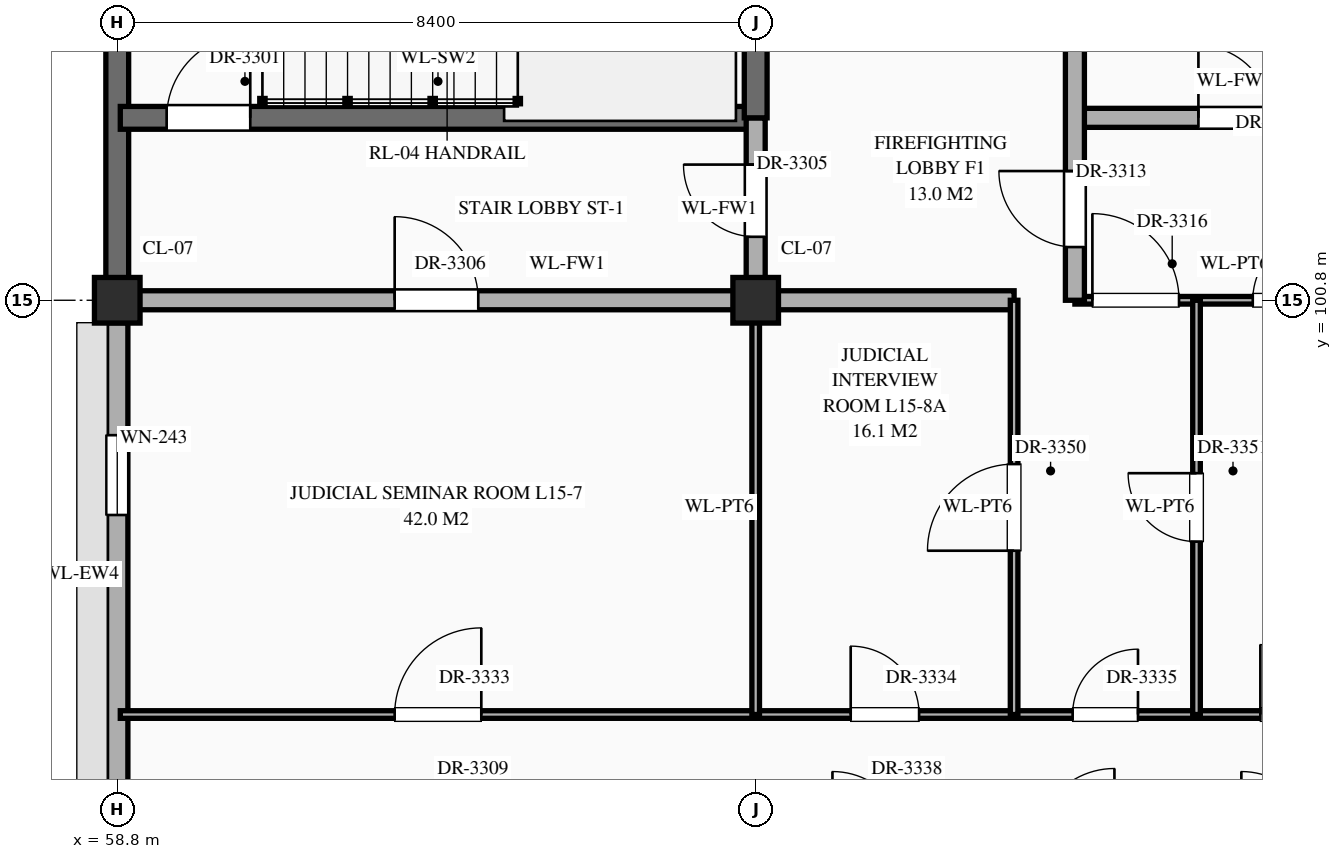
"""IFC4 building model, lengths in metres.
Left out: names, types, materials, properties, quantities, classifications, styles, units other than length and angle.
Written with IfcOpenShell. Run it as: python <this file> out.ifc"""

import sys

from ifc_helpers import new_model, si_unit, direction, frame, frame_2d, origin, origin_2d, place, context, subcontext, project, spatial, rectangle, extrude, element, fill, save


model = new_model("IFC4")
c1 = context("Model", 3, precision=1e-05, world=origin(), true_north=direction((0.0, 1.0)))
c2 = subcontext(c1, "Body", "Model", "MODEL_VIEW")
j1 = project(units=[si_unit("LENGTHUNIT", "METRE"), si_unit("PLANEANGLEUNIT", "RADIAN")], contexts=[c1])
p1 = place(None, origin())
s1 = spatial("IfcSite", under=j1, at=p1, CompositionType="ELEMENT")
p2 = place(p1, origin())
s2 = spatial("IfcBuilding", under=s1, at=p2, CompositionType="ELEMENT")
p3 = place(p2, frame((0.0, 0.0, 64.5)))
s3 = spatial("IfcBuildingStorey", under=s2, at=p3, CompositionType="ELEMENT", Elevation=64.5)
for number, where, z_axis, x_axis in (
    (1, (58.8, 100.8, 0.0), (0.0, 0.0, 1.0), (1.0, 0.0, 0.0)),
    (2, (67.2, 100.8, 0.0), (0.0, 0.0, 1.0), (1.0, 0.0, 0.0)),
):
    element("IfcColumn", number, at=place(p3, frame(where, z_axis=z_axis, x_axis=x_axis)), inside=s3, PredefinedType="COLUMN", context=c2, shape_type="SweptSolid", body=[
        extrude(rectangle(XDim=0.6, YDim=0.6, at=origin_2d()), origin(), (0.0, 0.0, 1.0), 4.2),
    ])
p4 = place(p3, frame((58.8, 93.895, 0.0), z_axis=(0.0, 0.0, 1.0), x_axis=(0.0, 1.0, 0.0)))
e3 = element("IfcWall", 3, at=p4, inside=s3, PredefinedType="STANDARD", context=c2, shape_type="SweptSolid", body=[
    extrude(rectangle(XDim=6.61, YDim=0.28, at=frame_2d((3.305, 0.0))), origin(), (0.0, 0.0, 1.0), 3.3),
])
p5 = place(p4, frame((4.08, 0.0, 0.85)))
e4 = element("IfcOpeningElement", 4, at=p5, cuts=e3, PredefinedType="OPENING", context=c2, shape_type="SweptSolid", body=[
    extrude(rectangle(XDim=1.05, YDim=1.74, at=frame_2d((0.525, 0.87))), frame((0.0, 0.152, 0.0), z_axis=(0.0, -1.0, 0.0), x_axis=(1.0, 0.0, 0.0)), (0.0, 0.0, 1.0), 0.304),
])
p6 = place(p3, frame((58.8, 101.095, 0.0), z_axis=(0.0, 0.0, 1.0), x_axis=(0.0, 1.0, 0.0)))
e5 = element("IfcWall", 5, at=p6, inside=s3, PredefinedType="SHEAR", context=c2, shape_type="SweptSolid", body=[
    extrude(rectangle(XDim=6.61, YDim=0.3, at=frame_2d((3.305, 0.0))), origin(), (0.0, 0.0, 1.0), 3.95),
])
p7 = place(p3, frame((58.84, 95.35, 0.0), z_axis=(0.0, 0.0, 1.0), x_axis=(1.0, 0.0, 0.0)))
e6 = element("IfcWall", 6, at=p7, inside=s3, PredefinedType="STANDARD", context=c2, shape_type="SweptSolid", body=[
    extrude(rectangle(XDim=50.32, YDim=0.1, at=frame_2d((25.16, 0.0))), origin(), (0.0, 0.0, 1.0), 3.95),
])
p8 = place(p7, frame((3.61, 0.0, 0.0)))
e7 = element("IfcOpeningElement", 7, at=p8, cuts=e6, PredefinedType="OPENING", context=c2, shape_type="SweptSolid", body=[
    extrude(rectangle(XDim=1.14, YDim=2.4, at=frame_2d((0.57, 1.2))), frame((0.0, 0.062, 0.0), z_axis=(0.0, -1.0, 0.0), x_axis=(1.0, 0.0, 0.0)), (0.0, 0.0, 1.0), 0.124),
])
p9 = place(p7, frame((9.61, 0.0, 0.0)))
e8 = element("IfcOpeningElement", 8, at=p9, cuts=e6, PredefinedType="OPENING", context=c2, shape_type="SweptSolid", body=[
    extrude(rectangle(XDim=0.9, YDim=2.15, at=frame_2d((0.45, 1.075))), frame((0.0, 0.062, 0.0), z_axis=(0.0, -1.0, 0.0), x_axis=(1.0, 0.0, 0.0)), (0.0, 0.0, 1.0), 0.124),
])
p10 = place(p7, frame((12.53, 0.0, 0.0)))
e9 = element("IfcOpeningElement", 9, at=p10, cuts=e6, PredefinedType="OPENING", context=c2, shape_type="SweptSolid", body=[
    extrude(rectangle(XDim=0.86, YDim=2.1, at=frame_2d((0.43, 1.05))), frame((0.0, 0.062, 0.0), z_axis=(0.0, -1.0, 0.0), x_axis=(1.0, 0.0, 0.0)), (0.0, 0.0, 1.0), 0.124),
])
p11 = place(p7, frame((15.0, 0.0, 0.0)))
e10 = element("IfcOpeningElement", 10, at=p11, cuts=e6, PredefinedType="OPENING", context=c2, shape_type="SweptSolid", body=[
    extrude(rectangle(XDim=0.92, YDim=2.15, at=frame_2d((0.46, 1.075))), frame((0.0, 0.062, 0.0), z_axis=(0.0, -1.0, 0.0), x_axis=(1.0, 0.0, 0.0)), (0.0, 0.0, 1.0), 0.124),
])
p12 = place(p7, frame((20.48, 0.0, 0.0)))
e11 = element("IfcOpeningElement", 11, at=p12, cuts=e6, PredefinedType="OPENING", context=c2, shape_type="SweptSolid", body=[
    extrude(rectangle(XDim=0.96, YDim=2.2, at=frame_2d((0.48, 1.1))), frame((0.0, 0.062, 0.0), z_axis=(0.0, -1.0, 0.0), x_axis=(1.0, 0.0, 0.0)), (0.0, 0.0, 1.0), 0.124),
])
p13 = place(p7, frame((28.8, 0.0, 0.0)))
e12 = element("IfcOpeningElement", 12, at=p13, cuts=e6, PredefinedType="OPENING", context=c2, shape_type="SweptSolid", body=[
    extrude(rectangle(XDim=1.12, YDim=2.25, at=frame_2d((0.56, 1.125))), frame((0.0, 0.062, 0.0), z_axis=(0.0, -1.0, 0.0), x_axis=(1.0, 0.0, 0.0)), (0.0, 0.0, 1.0), 0.124),
])
p14 = place(p7, frame((34.68, 0.0, 0.0)))
e13 = element("IfcOpeningElement", 13, at=p14, cuts=e6, PredefinedType="OPENING", context=c2, shape_type="SweptSolid", body=[
    extrude(rectangle(XDim=1.16, YDim=2.3, at=frame_2d((0.58, 1.15))), frame((0.0, 0.062, 0.0), z_axis=(0.0, -1.0, 0.0), x_axis=(1.0, 0.0, 0.0)), (0.0, 0.0, 1.0), 0.124),
])
p15 = place(p7, frame((37.56, 0.0, 0.0)))
e14 = element("IfcOpeningElement", 14, at=p15, cuts=e6, PredefinedType="OPENING", context=c2, shape_type="SweptSolid", body=[
    extrude(rectangle(XDim=1.2, YDim=2.35, at=frame_2d((0.6, 1.175))), frame((0.0, 0.062, 0.0), z_axis=(0.0, -1.0, 0.0), x_axis=(1.0, 0.0, 0.0)), (0.0, 0.0, 1.0), 0.124),
])
p16 = place(p7, frame((40.04, 0.0, 0.0)))
e15 = element("IfcOpeningElement", 15, at=p16, cuts=e6, PredefinedType="OPENING", context=c2, shape_type="SweptSolid", body=[
    extrude(rectangle(XDim=1.24, YDim=2.3, at=frame_2d((0.62, 1.15))), frame((0.0, 0.062, 0.0), z_axis=(0.0, -1.0, 0.0), x_axis=(1.0, 0.0, 0.0)), (0.0, 0.0, 1.0), 0.124),
])
p17 = place(p7, frame((45.5, 0.0, 0.0)))
e16 = element("IfcOpeningElement", 16, at=p17, cuts=e6, PredefinedType="OPENING", context=c2, shape_type="SweptSolid", body=[
    extrude(rectangle(XDim=1.28, YDim=2.35, at=frame_2d((0.64, 1.175))), frame((0.0, 0.062, 0.0), z_axis=(0.0, -1.0, 0.0), x_axis=(1.0, 0.0, 0.0)), (0.0, 0.0, 1.0), 0.124),
])
p18 = place(p3, frame((58.84, 100.8, 0.0), z_axis=(0.0, 0.0, 1.0), x_axis=(1.0, 0.0, 0.0)))
e17 = element("IfcWall", 17, at=p18, inside=s3, PredefinedType="STANDARD", context=c2, shape_type="SweptSolid", body=[
    extrude(rectangle(XDim=11.76, YDim=0.25, at=frame_2d((5.88, 0.0))), origin(), (0.0, 0.0, 1.0), 3.1),
])
p19 = place(p18, frame((3.61, 0.0, 0.0)))
e18 = element("IfcOpeningElement", 18, at=p19, cuts=e17, PredefinedType="OPENING", context=c2, shape_type="SweptSolid", body=[
    extrude(rectangle(XDim=1.1, YDim=2.2, at=frame_2d((0.55, 1.1))), frame((0.0, 0.137, 0.0), z_axis=(0.0, -1.0, 0.0), x_axis=(1.0, 0.0, 0.0)), (0.0, 0.0, 1.0), 0.274),
])
p20 = place(p3, frame((71.4, 100.8, 0.0), z_axis=(0.0, 0.0, 1.0), x_axis=(1.0, 0.0, 0.0)))
e19 = element("IfcWall", 19, at=p20, inside=s3, PredefinedType="STANDARD", context=c2, shape_type="SweptSolid", body=[
    extrude(rectangle(XDim=4.2, YDim=0.1, at=frame_2d((2.1, 0.0))), origin(), (0.0, 0.0, 1.0), 3.1),
])
p21 = place(p20, frame((0.23, 0.0, 0.0)))
e20 = element("IfcOpeningElement", 20, at=p21, cuts=e19, PredefinedType="OPENING", context=c2, shape_type="SweptSolid", body=[
    extrude(rectangle(XDim=1.14, YDim=2.4, at=frame_2d((0.57, 1.2))), frame((0.0, 0.062, 0.0), z_axis=(0.0, -1.0, 0.0), x_axis=(1.0, 0.0, 0.0)), (0.0, 0.0, 1.0), 0.124),
])
p22 = place(p20, frame((2.34, 0.0, 0.0)))
e21 = element("IfcOpeningElement", 21, at=p22, cuts=e19, PredefinedType="OPENING", context=c2, shape_type="SweptSolid", body=[
    extrude(rectangle(XDim=0.9, YDim=2.15, at=frame_2d((0.45, 1.075))), frame((0.0, 0.062, 0.0), z_axis=(0.0, -1.0, 0.0), x_axis=(1.0, 0.0, 0.0)), (0.0, 0.0, 1.0), 0.124),
])
p23 = place(p3, frame((58.84, 103.2, 0.0), z_axis=(0.0, 0.0, 1.0), x_axis=(1.0, 0.0, 0.0)))
e22 = element("IfcWall", 22, at=p23, inside=s3, PredefinedType="SHEAR", context=c2, shape_type="SweptSolid", body=[
    extrude(rectangle(XDim=8.36, YDim=0.3, at=frame_2d((4.18, 0.0))), origin(), (0.0, 0.0, 1.0), 3.95),
])
p24 = place(p23, frame((0.61, 0.0, 0.0)))
e23 = element("IfcOpeningElement", 23, at=p24, cuts=e22, PredefinedType="OPENING", context=c2, shape_type="SweptSolid", body=[
    extrude(rectangle(XDim=1.1, YDim=2.2, at=frame_2d((0.55, 1.1))), frame((0.0, 0.162, 0.0), z_axis=(0.0, -1.0, 0.0), x_axis=(1.0, 0.0, 0.0)), (0.0, 0.0, 1.0), 0.324),
])
p25 = place(p3, frame((71.4, 103.2, 0.0), z_axis=(0.0, 0.0, 1.0), x_axis=(1.0, 0.0, 0.0)))
e24 = element("IfcWall", 24, at=p25, inside=s3, PredefinedType="STANDARD", context=c2, shape_type="SweptSolid", body=[
    extrude(rectangle(XDim=4.2, YDim=0.25, at=frame_2d((2.1, 0.0))), origin(), (0.0, 0.0, 1.0), 3.95),
])
p26 = place(p25, frame((1.625, 0.0, 0.0)))
e25 = element("IfcOpeningElement", 25, at=p26, cuts=e24, PredefinedType="OPENING", context=c2, shape_type="SweptSolid", body=[
    extrude(rectangle(XDim=0.95, YDim=2.15, at=frame_2d((0.475, 1.075))), frame((0.0, 0.137, 0.0), z_axis=(0.0, -1.0, 0.0), x_axis=(1.0, 0.0, 0.0)), (0.0, 0.0, 1.0), 0.274),
])
p27 = place(p3, frame((67.2, 95.35, 0.0), z_axis=(0.0, 0.0, 1.0), x_axis=(0.0, 1.0, 0.0)))
e26 = element("IfcWall", 26, at=p27, inside=s3, PredefinedType="STANDARD", context=c2, shape_type="SweptSolid", body=[
    extrude(rectangle(XDim=5.45, YDim=0.1, at=frame_2d((2.725, 0.0))), origin(), (0.0, 0.0, 1.0), 3.2),
])
p28 = place(p3, frame((67.2, 100.8, 0.0), z_axis=(0.0, 0.0, 1.0), x_axis=(0.0, 1.0, 0.0)))
e27 = element("IfcWall", 27, at=p28, inside=s3, PredefinedType="STANDARD", context=c2, shape_type="SweptSolid", body=[
    extrude(rectangle(XDim=2.4, YDim=0.25, at=frame_2d((1.2, 0.0))), origin(), (0.0, 0.0, 1.0), 3.2),
])
p29 = place(p28, frame((0.835, 0.0, 0.0)))
e28 = element("IfcOpeningElement", 28, at=p29, cuts=e27, PredefinedType="OPENING", context=c2, shape_type="SweptSolid", body=[
    extrude(rectangle(XDim=0.95, YDim=2.15, at=frame_2d((0.475, 1.075))), frame((0.0, 0.137, 0.0), z_axis=(0.0, -1.0, 0.0), x_axis=(1.0, 0.0, 0.0)), (0.0, 0.0, 1.0), 0.274),
])
p30 = place(p3, frame((67.2, 103.2, 0.0), z_axis=(0.0, 0.0, 1.0), x_axis=(0.0, 1.0, 0.0)))
e29 = element("IfcWall", 29, at=p30, inside=s3, PredefinedType="SHEAR", context=c2, shape_type="SweptSolid", body=[
    extrude(rectangle(XDim=1.2, YDim=0.3, at=frame_2d((0.6, 0.0))), origin(), (0.0, 0.0, 1.0), 3.95),
])
p31 = place(p3, frame((70.6, 95.35, 0.0), z_axis=(0.0, 0.0, 1.0), x_axis=(0.0, 1.0, 0.0)))
e30 = element("IfcWall", 30, at=p31, inside=s3, PredefinedType="STANDARD", context=c2, shape_type="SweptSolid", body=[
    extrude(rectangle(XDim=5.45, YDim=0.1, at=frame_2d((2.725, 0.0))), origin(), (0.0, 0.0, 1.0), 3.95),
])
p32 = place(p31, frame((2.155, 0.0, 0.0)))
e31 = element("IfcOpeningElement", 31, at=p32, cuts=e30, PredefinedType="OPENING", context=c2, shape_type="SweptSolid", body=[
    extrude(rectangle(XDim=1.14, YDim=2.4, at=frame_2d((0.57, 1.2))), frame((0.0, 0.062, 0.0), z_axis=(0.0, -1.0, 0.0), x_axis=(1.0, 0.0, 0.0)), (0.0, 0.0, 1.0), 0.124),
])
p33 = place(p3, frame((71.4, 100.8, 0.0), z_axis=(0.0, 0.0, 1.0), x_axis=(0.0, 1.0, 0.0)))
e32 = element("IfcWall", 32, at=p33, inside=s3, PredefinedType="STANDARD", context=c2, shape_type="SweptSolid", body=[
    extrude(rectangle(XDim=3.6, YDim=0.25, at=frame_2d((1.8, 0.0))), origin(), (0.0, 0.0, 1.0), 3.6),
])
p34 = place(p33, frame((0.7, 0.0, 0.0)))
e33 = element("IfcOpeningElement", 33, at=p34, cuts=e32, PredefinedType="OPENING", context=c2, shape_type="SweptSolid", body=[
    extrude(rectangle(XDim=1.0, YDim=2.2, at=frame_2d((0.5, 1.1))), frame((0.0, 0.137, 0.0), z_axis=(0.0, -1.0, 0.0), x_axis=(1.0, 0.0, 0.0)), (0.0, 0.0, 1.0), 0.274),
])
p35 = place(p3, frame((73.0, 95.35, 0.0), z_axis=(0.0, 0.0, 1.0), x_axis=(0.0, 1.0, 0.0)))
e34 = element("IfcWall", 34, at=p35, inside=s3, PredefinedType="STANDARD", context=c2, shape_type="SweptSolid", body=[
    extrude(rectangle(XDim=5.45, YDim=0.1, at=frame_2d((2.725, 0.0))), origin(), (0.0, 0.0, 1.0), 3.95),
])
p36 = place(p35, frame((2.275, 0.0, 0.0)))
e35 = element("IfcOpeningElement", 35, at=p36, cuts=e34, PredefinedType="OPENING", context=c2, shape_type="SweptSolid", body=[
    extrude(rectangle(XDim=0.9, YDim=2.15, at=frame_2d((0.45, 1.075))), frame((0.0, 0.062, 0.0), z_axis=(0.0, -1.0, 0.0), x_axis=(1.0, 0.0, 0.0)), (0.0, 0.0, 1.0), 0.124),
])
p37 = place(p5, origin())
e36 = element("IfcWindow", 36, at=p37, inside=s3, PartitioningType="SINGLE_PANEL", PredefinedType="WINDOW", context=c2, shape_type="SweptSolid", body=[
    extrude(rectangle(XDim=1.05, YDim=1.74, at=frame_2d((0.525, 0.87))), frame((0.0, 0.03, 0.0), z_axis=(0.0, -1.0, 0.0), x_axis=(1.0, 0.0, 0.0)), (0.0, 0.0, 1.0), 0.06),
])
fill(e4, e36)
p38 = place(p24, origin())
e37 = element("IfcDoor", 37, at=p38, inside=s3, OperationType="SINGLE_SWING_RIGHT", PredefinedType="DOOR", context=c2, shape_type="SweptSolid", body=[
    extrude(rectangle(XDim=1.1, YDim=2.2, at=frame_2d((0.55, 1.1))), frame((0.0, 0.025, 0.0), z_axis=(0.0, -1.0, 0.0), x_axis=(1.0, 0.0, 0.0)), (0.0, 0.0, 1.0), 0.05),
])
fill(e23, e37)
p39 = place(p29, origin())
e38 = element("IfcDoor", 38, at=p39, inside=s3, OperationType="SINGLE_SWING_RIGHT", PredefinedType="DOOR", context=c2, shape_type="SweptSolid", body=[
    extrude(rectangle(XDim=0.95, YDim=2.15, at=frame_2d((0.475, 1.075))), frame((0.0, 0.025, 0.0), z_axis=(0.0, -1.0, 0.0), x_axis=(1.0, 0.0, 0.0)), (0.0, 0.0, 1.0), 0.05),
])
fill(e28, e38)
p40 = place(p19, origin())
e39 = element("IfcDoor", 39, at=p40, inside=s3, OperationType="SINGLE_SWING_LEFT", PredefinedType="DOOR", context=c2, shape_type="SweptSolid", body=[
    extrude(rectangle(XDim=1.1, YDim=2.2, at=frame_2d((0.55, 1.1))), frame((0.0, 0.025, 0.0), z_axis=(0.0, -1.0, 0.0), x_axis=(1.0, 0.0, 0.0)), (0.0, 0.0, 1.0), 0.05),
])
fill(e18, e39)
p41 = place(p34, origin())
e40 = element("IfcDoor", 40, at=p41, inside=s3, OperationType="SINGLE_SWING_RIGHT", PredefinedType="DOOR", context=c2, shape_type="SweptSolid", body=[
    extrude(rectangle(XDim=1.0, YDim=2.2, at=frame_2d((0.5, 1.1))), frame((0.0, 0.025, 0.0), z_axis=(0.0, -1.0, 0.0), x_axis=(1.0, 0.0, 0.0)), (0.0, 0.0, 1.0), 0.05),
])
fill(e33, e40)
p42 = place(p26, origin())
e41 = element("IfcDoor", 41, at=p42, inside=s3, OperationType="SINGLE_SWING_LEFT", PredefinedType="DOOR", context=c2, shape_type="SweptSolid", body=[
    extrude(rectangle(XDim=0.95, YDim=2.15, at=frame_2d((0.475, 1.075))), frame((0.0, 0.025, 0.0), z_axis=(0.0, -1.0, 0.0), x_axis=(1.0, 0.0, 0.0)), (0.0, 0.0, 1.0), 0.05),
])
fill(e25, e41)
p43 = place(p21, origin())
e42 = element("IfcDoor", 42, at=p43, inside=s3, OperationType="SINGLE_SWING_LEFT", PredefinedType="DOOR", context=c2, shape_type="SweptSolid", body=[
    extrude(rectangle(XDim=1.14, YDim=2.4, at=frame_2d((0.57, 1.2))), frame((0.0, 0.025, 0.0), z_axis=(0.0, -1.0, 0.0), x_axis=(1.0, 0.0, 0.0)), (0.0, 0.0, 1.0), 0.05),
])
fill(e20, e42)
p44 = place(p22, origin())
e43 = element("IfcDoor", 43, at=p44, inside=s3, OperationType="SINGLE_SWING_RIGHT", PredefinedType="DOOR", context=c2, shape_type="SweptSolid", body=[
    extrude(rectangle(XDim=0.9, YDim=2.15, at=frame_2d((0.45, 1.075))), frame((0.0, 0.025, 0.0), z_axis=(0.0, -1.0, 0.0), x_axis=(1.0, 0.0, 0.0)), (0.0, 0.0, 1.0), 0.05),
])
fill(e21, e43)
p45 = place(p8, origin())
e44 = element("IfcDoor", 44, at=p45, inside=s3, OperationType="SINGLE_SWING_RIGHT", PredefinedType="DOOR", context=c2, shape_type="SweptSolid", body=[
    extrude(rectangle(XDim=1.14, YDim=2.4, at=frame_2d((0.57, 1.2))), frame((0.0, 0.025, 0.0), z_axis=(0.0, -1.0, 0.0), x_axis=(1.0, 0.0, 0.0)), (0.0, 0.0, 1.0), 0.05),
])
fill(e7, e44)
p46 = place(p9, origin())
e45 = element("IfcDoor", 45, at=p46, inside=s3, OperationType="SINGLE_SWING_LEFT", PredefinedType="DOOR", context=c2, shape_type="SweptSolid", body=[
    extrude(rectangle(XDim=0.9, YDim=2.15, at=frame_2d((0.45, 1.075))), frame((0.0, 0.025, 0.0), z_axis=(0.0, -1.0, 0.0), x_axis=(1.0, 0.0, 0.0)), (0.0, 0.0, 1.0), 0.05),
])
fill(e8, e45)
p47 = place(p10, origin())
e46 = element("IfcDoor", 46, at=p47, inside=s3, OperationType="SINGLE_SWING_RIGHT", PredefinedType="DOOR", context=c2, shape_type="SweptSolid", body=[
    extrude(rectangle(XDim=0.86, YDim=2.1, at=frame_2d((0.43, 1.05))), frame((0.0, 0.025, 0.0), z_axis=(0.0, -1.0, 0.0), x_axis=(1.0, 0.0, 0.0)), (0.0, 0.0, 1.0), 0.05),
])
fill(e9, e46)
p48 = place(p11, origin())
e47 = element("IfcDoor", 47, at=p48, inside=s3, OperationType="SINGLE_SWING_LEFT", PredefinedType="DOOR", context=c2, shape_type="SweptSolid", body=[
    extrude(rectangle(XDim=0.92, YDim=2.15, at=frame_2d((0.46, 1.075))), frame((0.0, 0.025, 0.0), z_axis=(0.0, -1.0, 0.0), x_axis=(1.0, 0.0, 0.0)), (0.0, 0.0, 1.0), 0.05),
])
fill(e10, e47)
p49 = place(p32, origin())
e48 = element("IfcDoor", 48, at=p49, inside=s3, OperationType="SINGLE_SWING_LEFT", PredefinedType="DOOR", context=c2, shape_type="SweptSolid", body=[
    extrude(rectangle(XDim=1.14, YDim=2.4, at=frame_2d((0.57, 1.2))), frame((0.0, 0.025, 0.0), z_axis=(0.0, -1.0, 0.0), x_axis=(1.0, 0.0, 0.0)), (0.0, 0.0, 1.0), 0.05),
])
fill(e31, e48)
p50 = place(p36, origin())
e49 = element("IfcDoor", 49, at=p50, inside=s3, OperationType="SINGLE_SWING_RIGHT", PredefinedType="DOOR", context=c2, shape_type="SweptSolid", body=[
    extrude(rectangle(XDim=0.9, YDim=2.15, at=frame_2d((0.45, 1.075))), frame((0.0, 0.025, 0.0), z_axis=(0.0, -1.0, 0.0), x_axis=(1.0, 0.0, 0.0)), (0.0, 0.0, 1.0), 0.05),
])
fill(e35, e49)
save(model, sys.argv[1])
